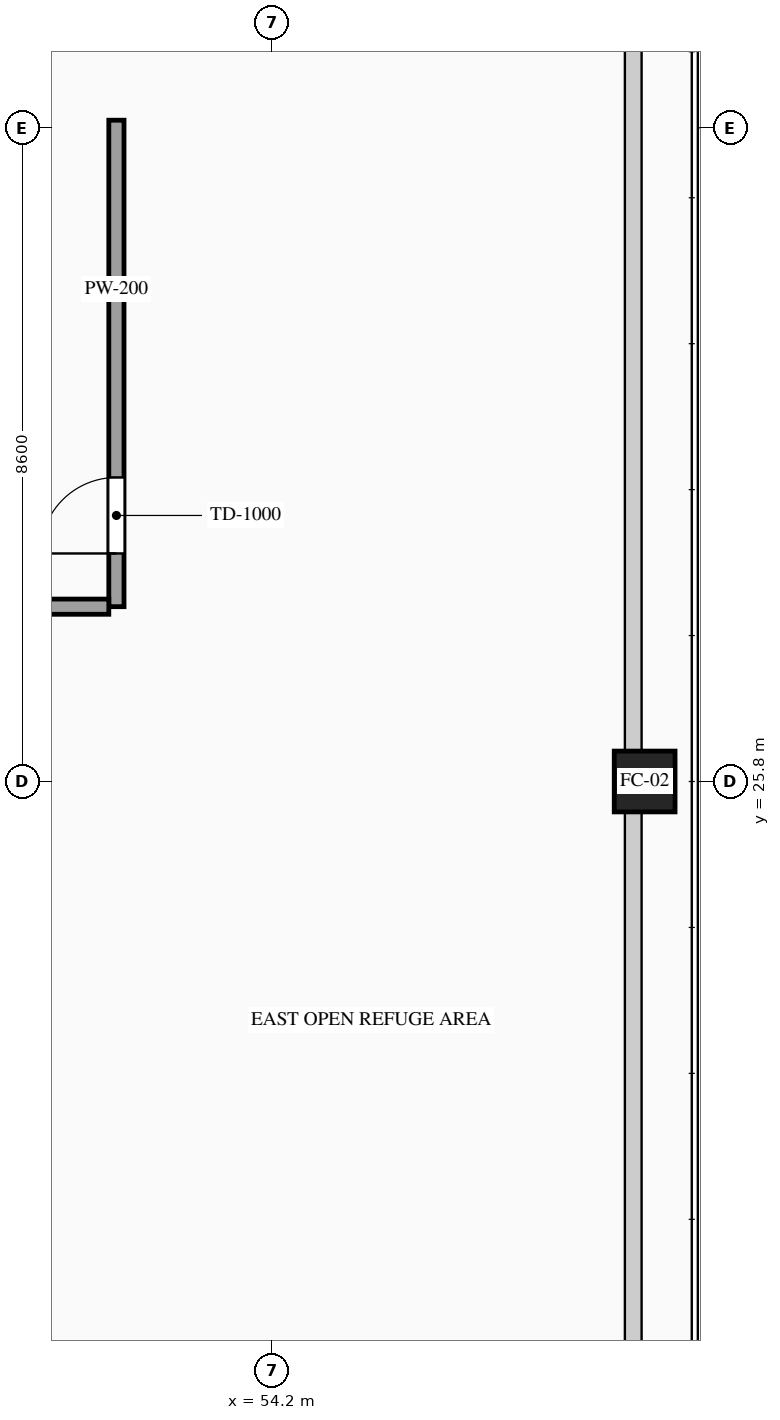
"""IFC4 building model, lengths in metres.
Left out: names, types, materials, properties, quantities, classifications, styles, units other than length and angle.
Written with IfcOpenShell. Run it as: python <this file> out.ifc"""

import sys

from ifc_helpers import new_model, si_unit, direction, frame, frame_2d, origin, origin_2d, place, context, subcontext, project, spatial, rectangle, hollow_rectangle, extrude, source, transform, mapped, element, fill, save


model = new_model("IFC4")
c1 = context("Model", 3, precision=1e-05, world=origin(), true_north=direction((0.0, 1.0)))
c2 = subcontext(c1, "Body", "Model", "MODEL_VIEW")
j1 = project(units=[si_unit("LENGTHUNIT", "METRE"), si_unit("PLANEANGLEUNIT", "RADIAN")], contexts=[c1])
p1 = place(None, origin())
s1 = spatial("IfcSite", under=j1, at=p1, CompositionType="ELEMENT")
p2 = place(p1, origin())
s2 = spatial("IfcBuilding", under=s1, at=p2, CompositionType="ELEMENT")
p3 = place(p2, frame((0.0, 0.0, 176.4)))
s3 = spatial("IfcBuildingStorey", under=s2, at=p3, CompositionType="ELEMENT", Elevation=176.4)
m1 = source(origin(), c2, "Body", "SweptSolid", [
    extrude(hollow_rectangle(XDim=0.8, YDim=0.8, WallThickness=0.036, at=origin_2d()), origin(), (0.0, 0.0, 1.0), 4.6),
])
p4 = place(p3, frame((59.1, 25.8, 0.0), z_axis=(0.0, 0.0, 1.0), x_axis=(1.0, 0.0, 0.0)))
e1 = element("IfcColumn", 1, at=p4, inside=s3, PredefinedType="COLUMN", context=c2, shape_type="MappedRepresentation", body=[
    mapped(m1, transform((0.0, 0.0, 0.0), scale=1.0)),
])
p5 = place(p3, frame((52.15, 28.1, 0.0), z_axis=(0.0, 0.0, 1.0), x_axis=(0.0, 1.0, 0.0)))
e2 = element("IfcWall", 2, at=p5, inside=s3, PredefinedType="PARTITIONING", context=c2, shape_type="SweptSolid", body=[
    extrude(rectangle(XDim=6.4, YDim=0.2, at=frame_2d((3.2, 0.0))), origin(), (0.0, 0.0, 1.0), 4.38),
])
p6 = place(p5, frame((0.7, 0.0, 0.0)))
e3 = element("IfcOpeningElement", 3, at=p6, cuts=e2, PredefinedType="OPENING", context=c2, shape_type="SweptSolid", body=[
    extrude(rectangle(XDim=1.0, YDim=2.2, at=frame_2d((0.5, 1.1))), frame((0.0, 0.115, 0.0), z_axis=(0.0, -1.0, 0.0), x_axis=(1.0, 0.0, 0.0)), (0.0, 0.0, 1.0), 0.23),
])
m2 = source(origin(), c2, "Body", "SweptSolid", [
    extrude(rectangle(XDim=1.505, YDim=0.2, at=frame_2d((0.752, 0.0))), origin(), (0.0, 0.0, 1.0), 4.38),
])
p7 = place(p3, frame((50.545, 28.1, 0.0), z_axis=(0.0, 0.0, 1.0), x_axis=(1.0, 0.0, 0.0)))
e4 = element("IfcWall", 4, at=p7, inside=s3, PredefinedType="PARTITIONING", context=c2, shape_type="MappedRepresentation", body=[
    mapped(m2, transform((0.0, 0.0, 0.0), scale=1.0)),
])
m3 = source(origin(), c2, "Body", "SweptSolid", [
    extrude(rectangle(XDim=1.0, YDim=2.2, at=frame_2d((0.5, 1.1))), frame((0.0, 0.025, 0.0), z_axis=(0.0, -1.0, 0.0), x_axis=(1.0, 0.0, 0.0)), (0.0, 0.0, 1.0), 0.05),
])
p8 = place(p6, origin())
e5 = element("IfcDoor", 5, at=p8, inside=s3, OperationType="SINGLE_SWING_LEFT", PredefinedType="DOOR", context=c2, shape_type="MappedRepresentation", body=[
    mapped(m3, transform((0.0, 0.0, 0.0), scale=1.0)),
])
fill(e3, e5)
save(model, sys.argv[1])
